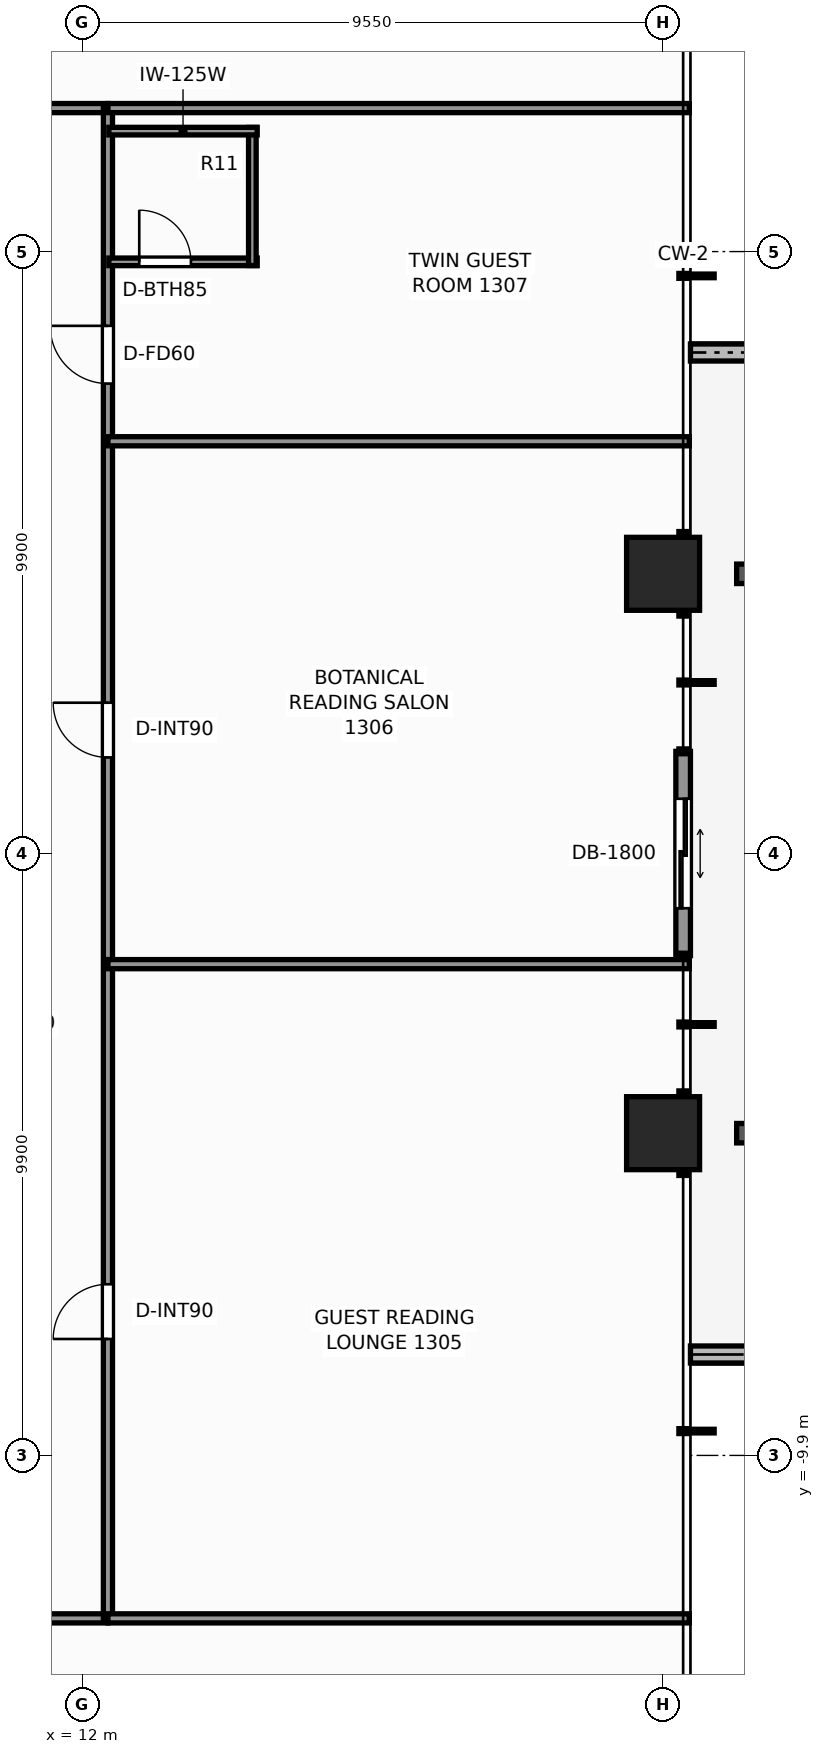
"""IFC4 building model, lengths in metres.
Left out: names, types, materials, properties, quantities, classifications, styles, units other than length and angle.
Written with IfcOpenShell. Run it as: python <this file> out.ifc"""

import sys

from ifc_helpers import new_model, si_unit, direction, frame, frame_2d, origin, origin_2d, place, context, subcontext, project, spatial, rectangle, extrude, element, fill, save


model = new_model("IFC4")
c1 = context("Model", 3, precision=1e-05, world=origin(), true_north=direction((0.0, 1.0)))
c2 = subcontext(c1, "Body", "Model", "MODEL_VIEW")
j1 = project(units=[si_unit("LENGTHUNIT", "METRE"), si_unit("PLANEANGLEUNIT", "RADIAN")], contexts=[c1])
p1 = place(None, origin())
s1 = spatial("IfcSite", under=j1, at=p1, CompositionType="ELEMENT")
p2 = place(p1, origin())
s2 = spatial("IfcBuilding", under=s1, at=p2, CompositionType="ELEMENT")
p3 = place(p2, frame((0.0, 0.0, 46.9)))
s3 = spatial("IfcBuildingStorey", under=s2, at=p3, CompositionType="ELEMENT", Elevation=46.9)
for number, where, z_axis, x_axis in (
    (1, (21.55, -4.6, 0.0), (0.0, 0.0, 1.0), (1.0, 0.0, 0.0)),
    (2, (21.55, 4.6, 0.0), (0.0, 0.0, 1.0), (1.0, 0.0, 0.0)),
):
    element("IfcColumn", number, at=place(p3, frame(where, z_axis=z_axis, x_axis=x_axis)), inside=s3, PredefinedType="COLUMN", context=c2, shape_type="SweptSolid", body=[
        extrude(rectangle(XDim=1.2, YDim=1.2, at=origin_2d()), origin(), (0.0, 0.0, 1.0), 3.3),
    ])
p4 = place(p3, frame((23.705, 8.24, -0.06), z_axis=(0.0, 0.0, 1.0), x_axis=(-1.0, 0.0, 0.0)))
e3 = element("IfcWall", 3, at=p4, inside=s3, PredefinedType="PARAPET", context=c2, shape_type="SweptSolid", body=[
    extrude(rectangle(XDim=1.705, YDim=0.28, at=frame_2d((0.853, 0.0))), origin(), (0.0, 0.0, 1.0), 0.42),
])
p5 = place(p3, frame((22.0, -8.24, -0.06), z_axis=(0.0, 0.0, 1.0), x_axis=(1.0, 0.0, 0.0)))
e4 = element("IfcWall", 4, at=p5, inside=s3, PredefinedType="PARAPET", context=c2, shape_type="SweptSolid", body=[
    extrude(rectangle(XDim=2.975, YDim=0.28, at=frame_2d((1.487, 0.0))), origin(), (0.0, 0.0, 1.0), 0.42),
])
p6 = place(p3, frame((21.88, 1.68, 0.0), z_axis=(0.0, 0.0, 1.0), x_axis=(0.0, -1.0, 0.0)))
e5 = element("IfcWall", 5, at=p6, inside=s3, PredefinedType="STANDARD", context=c2, shape_type="SweptSolid", body=[
    extrude(rectangle(XDim=3.36, YDim=0.24, at=frame_2d((1.68, 0.0))), origin(), (0.0, 0.0, 1.0), 3.06),
])
p7 = place(p6, frame((0.78, 0.0, 0.0)))
e6 = element("IfcOpeningElement", 6, at=p7, cuts=e5, PredefinedType="OPENING", context=c2, shape_type="SweptSolid", body=[
    extrude(rectangle(XDim=1.8, YDim=2.2, at=frame_2d((0.9, 1.1))), frame((0.0, 0.13, 0.0), z_axis=(0.0, -1.0, 0.0), x_axis=(1.0, 0.0, 0.0)), (0.0, 0.0, 1.0), 0.26),
])
p8 = place(p3, frame((-12.58, -12.58, 0.0), z_axis=(0.0, 0.0, 1.0), x_axis=(1.0, 0.0, 0.0)))
e7 = element("IfcWall", 7, at=p8, inside=s3, PredefinedType="PARTITIONING", context=c2, shape_type="SweptSolid", body=[
    extrude(rectangle(XDim=25.0, YDim=0.15, at=frame_2d((12.5, 0.0))), origin(), (0.0, 0.0, 1.0), 2.272),
])
p9 = place(p8, frame((3.118, 0.0, 0.0)))
e8 = element("IfcOpeningElement", 8, at=p9, cuts=e7, PredefinedType="OPENING", context=c2, shape_type="SweptSolid", body=[
    extrude(rectangle(XDim=0.9, YDim=2.06, at=frame_2d((0.45, 1.03))), frame((0.0, 0.085, 0.0), z_axis=(0.0, -1.0, 0.0), x_axis=(1.0, 0.0, 0.0)), (0.0, 0.0, 1.0), 0.17),
])
p10 = place(p8, frame((5.454, 0.0, 0.0)))
e9 = element("IfcOpeningElement", 9, at=p10, cuts=e7, PredefinedType="OPENING", context=c2, shape_type="SweptSolid", body=[
    extrude(rectangle(XDim=0.9, YDim=2.06, at=frame_2d((0.45, 1.03))), frame((0.0, 0.085, 0.0), z_axis=(0.0, -1.0, 0.0), x_axis=(1.0, 0.0, 0.0)), (0.0, 0.0, 1.0), 0.17),
])
p11 = place(p8, frame((14.16, 0.0, 0.0)))
e10 = element("IfcOpeningElement", 10, at=p11, cuts=e7, PredefinedType="OPENING", context=c2, shape_type="SweptSolid", body=[
    extrude(rectangle(XDim=0.9, YDim=2.06, at=frame_2d((0.45, 1.03))), frame((0.0, 0.085, 0.0), z_axis=(0.0, -1.0, 0.0), x_axis=(1.0, 0.0, 0.0)), (0.0, 0.0, 1.0), 0.17),
])
p12 = place(p8, frame((20.541, 0.0, 0.0)))
e11 = element("IfcOpeningElement", 11, at=p12, cuts=e7, PredefinedType="OPENING", context=c2, shape_type="SweptSolid", body=[
    extrude(rectangle(XDim=0.9, YDim=2.06, at=frame_2d((0.45, 1.03))), frame((0.0, 0.085, 0.0), z_axis=(0.0, -1.0, 0.0), x_axis=(1.0, 0.0, 0.0)), (0.0, 0.0, 1.0), 0.17),
])
p13 = place(p3, frame((-12.58, 12.26, 0.0), z_axis=(0.0, 0.0, 1.0), x_axis=(1.0, 0.0, 0.0)))
e12 = element("IfcWall", 12, at=p13, inside=s3, PredefinedType="PARTITIONING", context=c2, shape_type="SweptSolid", body=[
    extrude(rectangle(XDim=25.0, YDim=0.15, at=frame_2d((12.5, 0.0))), origin(), (0.0, 0.0, 1.0), 2.272),
])
p14 = place(p13, frame((3.379, 0.0, 0.0)))
e13 = element("IfcOpeningElement", 13, at=p14, cuts=e12, PredefinedType="OPENING", context=c2, shape_type="SweptSolid", body=[
    extrude(rectangle(XDim=0.9, YDim=2.06, at=frame_2d((0.45, 1.03))), frame((0.0, 0.085, 0.0), z_axis=(0.0, -1.0, 0.0), x_axis=(1.0, 0.0, 0.0)), (0.0, 0.0, 1.0), 0.17),
])
p15 = place(p13, frame((10.1, 0.0, 0.0)))
e14 = element("IfcOpeningElement", 14, at=p15, cuts=e12, PredefinedType="OPENING", context=c2, shape_type="SweptSolid", body=[
    extrude(rectangle(XDim=0.9, YDim=2.06, at=frame_2d((0.45, 1.03))), frame((0.0, 0.085, 0.0), z_axis=(0.0, -1.0, 0.0), x_axis=(1.0, 0.0, 0.0)), (0.0, 0.0, 1.0), 0.17),
])
p16 = place(p13, frame((19.665, 0.0, 0.0)))
e15 = element("IfcOpeningElement", 15, at=p16, cuts=e12, PredefinedType="OPENING", context=c2, shape_type="SweptSolid", body=[
    extrude(rectangle(XDim=0.9, YDim=2.06, at=frame_2d((0.45, 1.03))), frame((0.0, 0.085, 0.0), z_axis=(0.0, -1.0, 0.0), x_axis=(1.0, 0.0, 0.0)), (0.0, 0.0, 1.0), 0.17),
])
p17 = place(p3, frame((12.42, -12.58, 0.0), z_axis=(0.0, 0.0, 1.0), x_axis=(0.0, 1.0, 0.0)))
e16 = element("IfcWall", 16, at=p17, inside=s3, PredefinedType="PARTITIONING", context=c2, shape_type="SweptSolid", body=[
    extrude(rectangle(XDim=24.84, YDim=0.15, at=frame_2d((12.42, 0.0))), origin(), (0.0, 0.0, 1.0), 2.272),
])
p18 = place(p17, frame((4.595, 0.0, 0.0)))
e17 = element("IfcOpeningElement", 17, at=p18, cuts=e16, PredefinedType="OPENING", context=c2, shape_type="SweptSolid", body=[
    extrude(rectangle(XDim=0.9, YDim=2.06, at=frame_2d((0.45, 1.03))), frame((0.0, 0.085, 0.0), z_axis=(0.0, -1.0, 0.0), x_axis=(1.0, 0.0, 0.0)), (0.0, 0.0, 1.0), 0.17),
])
p19 = place(p17, frame((14.16, 0.0, 0.0)))
e18 = element("IfcOpeningElement", 18, at=p19, cuts=e16, PredefinedType="OPENING", context=c2, shape_type="SweptSolid", body=[
    extrude(rectangle(XDim=0.9, YDim=2.06, at=frame_2d((0.45, 1.03))), frame((0.0, 0.085, 0.0), z_axis=(0.0, -1.0, 0.0), x_axis=(1.0, 0.0, 0.0)), (0.0, 0.0, 1.0), 0.17),
])
p20 = place(p17, frame((20.309, 0.0, 0.0)))
e19 = element("IfcOpeningElement", 19, at=p20, cuts=e16, PredefinedType="OPENING", context=c2, shape_type="SweptSolid", body=[
    extrude(rectangle(XDim=0.95, YDim=2.06, at=frame_2d((0.475, 1.03))), frame((0.0, 0.085, 0.0), z_axis=(0.0, -1.0, 0.0), x_axis=(1.0, 0.0, 0.0)), (0.0, 0.0, 1.0), 0.17),
])
for number, where, z_axis, x_axis in (
    (20, (12.42, -12.58, 0.0), (0.0, 0.0, 1.0), (1.0, 0.0, 0.0)),
    (21, (12.42, 12.26, 0.0), (0.0, 0.0, 1.0), (1.0, 0.0, 0.0)),
):
    element("IfcWall", number, at=place(p3, frame(where, z_axis=z_axis, x_axis=x_axis)), inside=s3, PredefinedType="PARTITIONING", context=c2, shape_type="SweptSolid", body=[
        extrude(rectangle(XDim=9.56, YDim=0.15, at=frame_2d((4.78, 0.0))), origin(), (0.0, 0.0, 1.0), 2.272),
    ])
for number, where, z_axis, x_axis in (
    (22, (12.42, -1.82, 0.0), (0.0, 0.0, 1.0), (1.0, 0.0, 0.0)),
    (23, (12.42, 6.78, 0.0), (0.0, 0.0, 1.0), (1.0, 0.0, 0.0)),
):
    element("IfcWall", number, at=place(p3, frame(where, z_axis=z_axis, x_axis=x_axis)), inside=s3, PredefinedType="PARTITIONING", context=c2, shape_type="SweptSolid", body=[
        extrude(rectangle(XDim=9.56, YDim=0.15, at=frame_2d((4.78, 0.0))), origin(), (0.0, 0.0, 1.0), 2.429),
    ])
p21 = place(p3, frame((12.435, 9.731, 0.0), z_axis=(0.0, 0.0, 1.0), x_axis=(1.0, 0.0, 0.0)))
e24 = element("IfcWall", 24, at=p21, inside=s3, PredefinedType="PARTITIONING", context=c2, shape_type="SweptSolid", body=[
    extrude(rectangle(XDim=2.44, YDim=0.125, at=frame_2d((1.22, 0.0))), origin(), (0.0, 0.0, 1.0), 3.06),
])
p22 = place(p21, frame((0.5, 0.0, 0.0)))
e25 = element("IfcOpeningElement", 25, at=p22, cuts=e24, PredefinedType="OPENING", context=c2, shape_type="SweptSolid", body=[
    extrude(rectangle(XDim=0.85, YDim=2.03, at=frame_2d((0.425, 1.015))), frame((0.0, 0.073, 0.0), z_axis=(0.0, -1.0, 0.0), x_axis=(1.0, 0.0, 0.0)), (0.0, 0.0, 1.0), 0.145),
])
p23 = place(p3, frame((14.795, 9.671, 0.0), z_axis=(0.0, 0.0, 1.0), x_axis=(0.0, 1.0, 0.0)))
e26 = element("IfcWall", 26, at=p23, inside=s3, PredefinedType="PARTITIONING", context=c2, shape_type="SweptSolid", body=[
    extrude(rectangle(XDim=2.27, YDim=0.125, at=frame_2d((1.135, 0.0))), origin(), (0.0, 0.0, 1.0), 2.272),
])
p24 = place(p3, frame((12.435, 11.881, 0.0), z_axis=(0.0, 0.0, 1.0), x_axis=(1.0, 0.0, 0.0)))
e27 = element("IfcWall", 27, at=p24, inside=s3, PredefinedType="PARTITIONING", context=c2, shape_type="SweptSolid", body=[
    extrude(rectangle(XDim=2.44, YDim=0.125, at=frame_2d((1.22, 0.0))), origin(), (0.0, 0.0, 1.0), 2.272),
])
p25 = place(p7, origin())
e28 = element("IfcDoor", 28, at=p25, inside=s3, OperationType="DOUBLE_DOOR_SLIDING", PredefinedType="DOOR", context=c2, shape_type="SweptSolid", body=[
    extrude(rectangle(XDim=1.8, YDim=2.2, at=frame_2d((0.9, 1.1))), frame((0.0, 0.025, 0.0), z_axis=(0.0, -1.0, 0.0), x_axis=(1.0, 0.0, 0.0)), (0.0, 0.0, 1.0), 0.05),
])
fill(e6, e28)
p26 = place(p18, origin())
e29 = element("IfcDoor", 29, at=p26, inside=s3, OperationType="SINGLE_SWING_LEFT", PredefinedType="DOOR", context=c2, shape_type="SweptSolid", body=[
    extrude(rectangle(XDim=0.9, YDim=2.06, at=frame_2d((0.45, 1.03))), frame((0.0, 0.025, 0.0), z_axis=(0.0, -1.0, 0.0), x_axis=(1.0, 0.0, 0.0)), (0.0, 0.0, 1.0), 0.05),
])
fill(e17, e29)
p27 = place(p19, origin())
e30 = element("IfcDoor", 30, at=p27, inside=s3, OperationType="SINGLE_SWING_RIGHT", PredefinedType="DOOR", context=c2, shape_type="SweptSolid", body=[
    extrude(rectangle(XDim=0.9, YDim=2.06, at=frame_2d((0.45, 1.03))), frame((0.0, 0.025, 0.0), z_axis=(0.0, -1.0, 0.0), x_axis=(1.0, 0.0, 0.0)), (0.0, 0.0, 1.0), 0.05),
])
fill(e18, e30)
p28 = place(p22, origin())
e31 = element("IfcDoor", 31, at=p28, inside=s3, OperationType="SINGLE_SWING_LEFT", PredefinedType="DOOR", context=c2, shape_type="SweptSolid", body=[
    extrude(rectangle(XDim=0.85, YDim=2.03, at=frame_2d((0.425, 1.015))), frame((0.0, 0.025, 0.0), z_axis=(0.0, -1.0, 0.0), x_axis=(1.0, 0.0, 0.0)), (0.0, 0.0, 1.0), 0.05),
])
fill(e25, e31)
p29 = place(p20, origin())
e32 = element("IfcDoor", 32, at=p29, inside=s3, OperationType="SINGLE_SWING_RIGHT", PredefinedType="DOOR", context=c2, shape_type="SweptSolid", body=[
    extrude(rectangle(XDim=0.95, YDim=2.06, at=frame_2d((0.475, 1.03))), frame((0.0, 0.025, 0.0), z_axis=(0.0, -1.0, 0.0), x_axis=(1.0, 0.0, 0.0)), (0.0, 0.0, 1.0), 0.05),
])
fill(e19, e32)
save(model, sys.argv[1])
